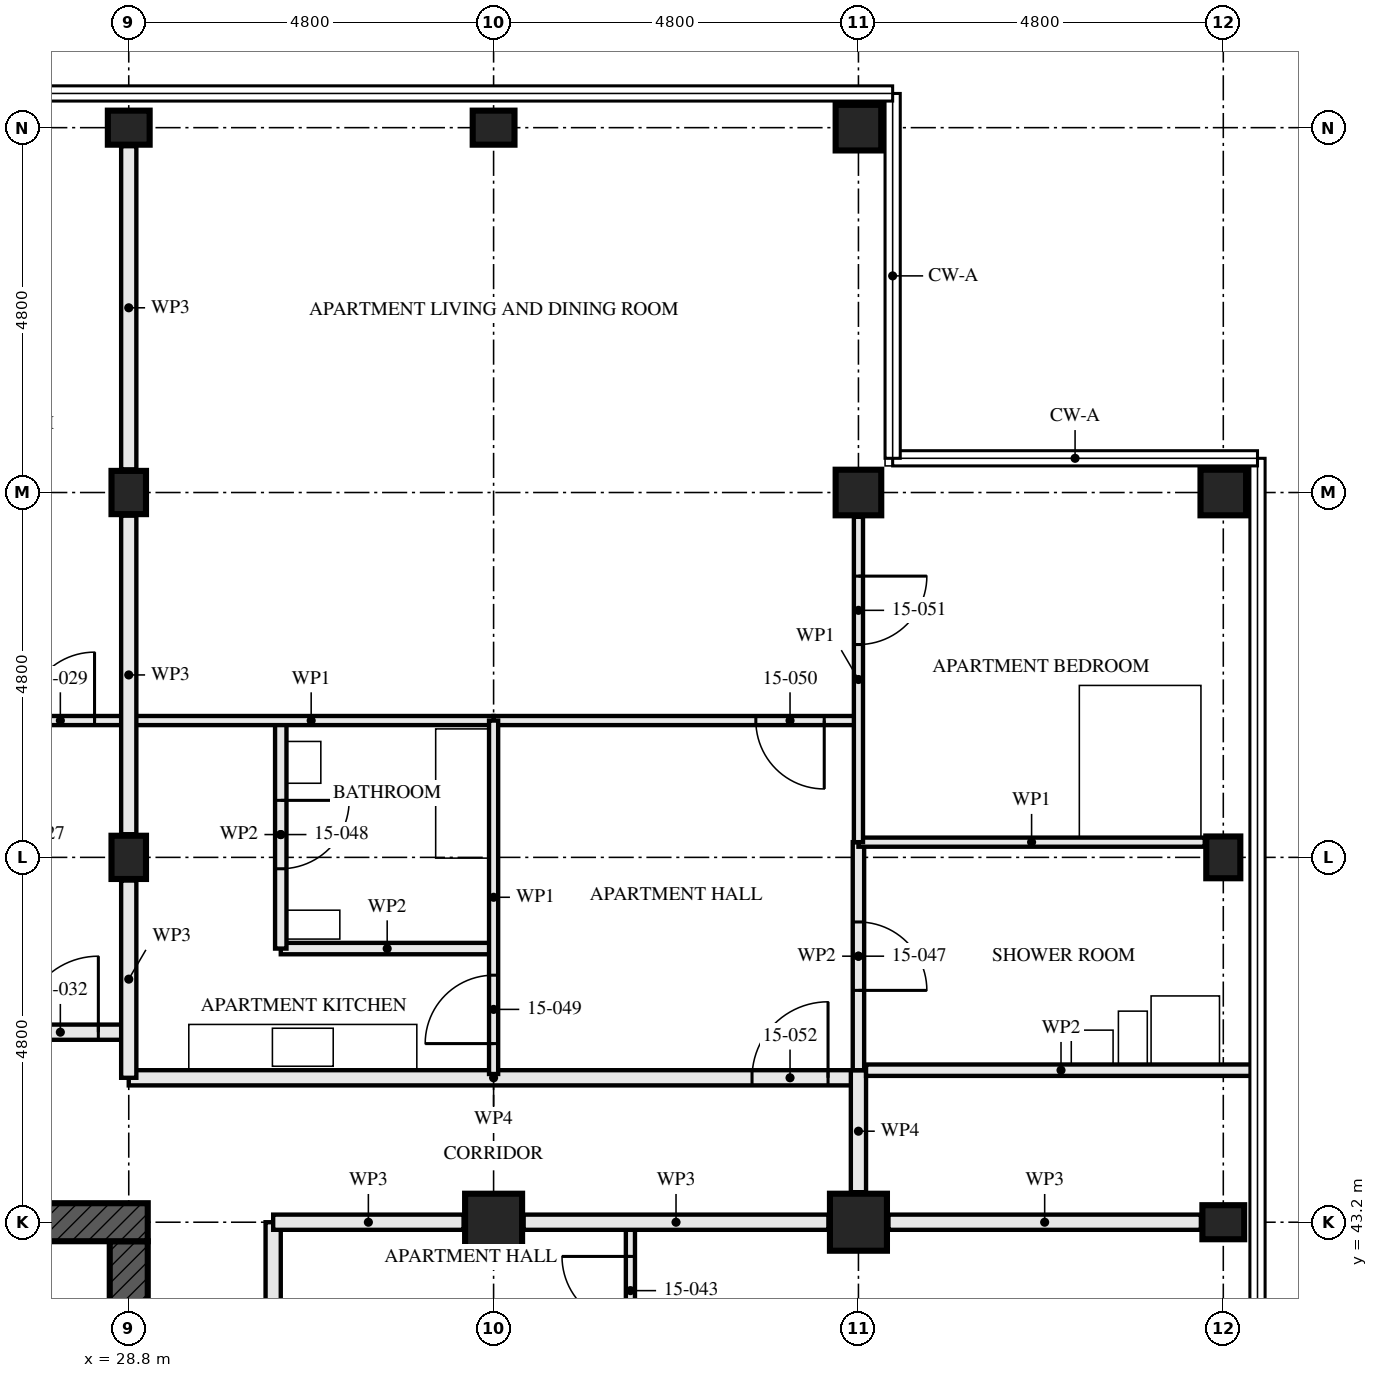
"""IFC4 building model, lengths in metres.
Left out: names, types, materials, properties, quantities, classifications, styles, units other than length and angle.
Written with IfcOpenShell. Run it as: python <this file> out.ifc"""

import sys

from ifc_helpers import new_model, si_unit, direction, frame, frame_2d, origin, origin_2d, place, context, subcontext, project, spatial, rectangle, hollow_rectangle, i_section, extrude, element, fill, save


model = new_model("IFC4")
c1 = context("Model", 3, precision=1e-05, world=origin(), true_north=direction((0.0, 1.0)))
c2 = subcontext(c1, "Body", "Model", "MODEL_VIEW")
j1 = project(units=[si_unit("LENGTHUNIT", "METRE"), si_unit("PLANEANGLEUNIT", "RADIAN")], contexts=[c1])
p1 = place(None, origin())
s1 = spatial("IfcSite", under=j1, at=p1, CompositionType="ELEMENT")
p2 = place(p1, origin())
s2 = spatial("IfcBuilding", under=s1, at=p2, CompositionType="ELEMENT")
p3 = place(p2, frame((0.0, 0.0, 58.5)))
s3 = spatial("IfcBuildingStorey", under=s2, at=p3, CompositionType="ELEMENT", Elevation=58.5)
for number, where, z_axis, x_axis in (
    (1, (28.8, 48.0, 0.0), (0.0, 0.0, 1.0), (1.0, 0.0, 0.0)),
    (2, (28.8, 52.8, 0.0), (0.0, 0.0, 1.0), (1.0, 0.0, 0.0)),
):
    element("IfcColumn", number, at=place(p3, frame(where, z_axis=z_axis, x_axis=x_axis)), inside=s3, PredefinedType="COLUMN", context=c2, shape_type="SweptSolid", body=[
        extrude(i_section(OverallWidth=0.454, OverallDepth=0.569, WebThickness=0.078, FlangeThickness=0.125, FilletRadius=0.015, at=origin_2d()), origin(), (0.0, 0.0, 1.0), 3.5),
    ])
p4 = place(p3, frame((28.8, 57.6, 0.0), z_axis=(0.0, 0.0, 1.0), x_axis=(0.0, 1.0, 0.0)))
e3 = element("IfcColumn", 3, at=p4, inside=s3, PredefinedType="COLUMN", context=c2, shape_type="SweptSolid", body=[
    extrude(i_section(OverallWidth=0.448, OverallDepth=0.55, WebThickness=0.072, FlangeThickness=0.115, FilletRadius=0.015, at=origin_2d()), origin(), (0.0, 0.0, 1.0), 3.5),
])
p5 = place(p3, frame((33.6, 43.2, 0.0), z_axis=(0.0, 0.0, 1.0), x_axis=(0.0, 1.0, 0.0)))
e4 = element("IfcColumn", 4, at=p5, inside=s3, PredefinedType="COLUMN", context=c2, shape_type="SweptSolid", body=[
    extrude(hollow_rectangle(XDim=0.75, YDim=0.75, WallThickness=0.08, at=origin_2d()), origin(), (0.0, 0.0, 1.0), 3.5),
])
p6 = place(p3, frame((33.6, 57.6, 0.0), z_axis=(0.0, 0.0, 1.0), x_axis=(0.0, 1.0, 0.0)))
e5 = element("IfcColumn", 5, at=p6, inside=s3, PredefinedType="COLUMN", context=c2, shape_type="SweptSolid", body=[
    extrude(i_section(OverallWidth=0.448, OverallDepth=0.55, WebThickness=0.072, FlangeThickness=0.115, FilletRadius=0.015, at=origin_2d()), origin(), (0.0, 0.0, 1.0), 3.5),
])
p7 = place(p3, frame((38.4, 43.2, 0.0), z_axis=(0.0, 0.0, 1.0), x_axis=(0.0, 1.0, 0.0)))
e6 = element("IfcColumn", 6, at=p7, inside=s3, PredefinedType="COLUMN", context=c2, shape_type="SweptSolid", body=[
    extrude(hollow_rectangle(XDim=0.75, YDim=0.75, WallThickness=0.08, at=origin_2d()), origin(), (0.0, 0.0, 1.0), 3.5),
])
for number, where, z_axis, x_axis in (
    (7, (38.4, 52.8, 0.0), (0.0, 0.0, 1.0), (0.0, 1.0, 0.0)),
    (8, (38.4, 57.6, 0.0), (0.0, 0.0, 1.0), (0.0, 1.0, 0.0)),
):
    element("IfcColumn", number, at=place(p3, frame(where, z_axis=z_axis, x_axis=x_axis)), inside=s3, PredefinedType="COLUMN", context=c2, shape_type="SweptSolid", body=[
        extrude(hollow_rectangle(XDim=0.6, YDim=0.6, WallThickness=0.05, at=origin_2d()), origin(), (0.0, 0.0, 1.0), 3.5),
    ])
for number, where, z_axis, x_axis in (
    (9, (43.2, 43.2, 0.0), (0.0, 0.0, 1.0), (0.0, 1.0, 0.0)),
    (10, (43.2, 48.0, 0.0), (0.0, 0.0, 1.0), (1.0, 0.0, 0.0)),
):
    element("IfcColumn", number, at=place(p3, frame(where, z_axis=z_axis, x_axis=x_axis)), inside=s3, PredefinedType="COLUMN", context=c2, shape_type="SweptSolid", body=[
        extrude(i_section(OverallWidth=0.448, OverallDepth=0.55, WebThickness=0.072, FlangeThickness=0.115, FilletRadius=0.015, at=origin_2d()), origin(), (0.0, 0.0, 1.0), 3.5),
    ])
p8 = place(p3, frame((43.2, 52.8, 0.0), z_axis=(0.0, 0.0, 1.0), x_axis=(0.0, 1.0, 0.0)))
e11 = element("IfcColumn", 11, at=p8, inside=s3, PredefinedType="COLUMN", context=c2, shape_type="SweptSolid", body=[
    extrude(hollow_rectangle(XDim=0.6, YDim=0.6, WallThickness=0.05, at=origin_2d()), origin(), (0.0, 0.0, 1.0), 3.5),
])
p9 = place(p3, frame((29.05, 43.2, -0.17), z_axis=(0.0, 0.0, 1.0), x_axis=(-1.0, 0.0, 0.0)))
e12 = element("IfcWall", 12, at=p9, inside=s3, PredefinedType="SHEAR", context=c2, shape_type="SweptSolid", body=[
    extrude(rectangle(XDim=14.9, YDim=0.5, at=frame_2d((7.45, 0.0))), origin(), (0.0, 0.0, 1.0), 3.5),
])
p10 = place(p9, frame((6.85, 0.0, 0.17)))
e13 = element("IfcOpeningElement", 13, at=p10, cuts=e12, PredefinedType="OPENING", context=c2, shape_type="SweptSolid", body=[
    extrude(rectangle(XDim=1.2, YDim=2.1, at=frame_2d((0.6, 1.05))), frame((0.0, 0.26, 0.0), z_axis=(0.0, -1.0, 0.0), x_axis=(1.0, 0.0, 0.0)), (0.0, 0.0, 1.0), 0.521),
])
p11 = place(p3, frame((28.8, 29.05, -0.17), z_axis=(0.0, 0.0, 1.0), x_axis=(0.0, 1.0, 0.0)))
e14 = element("IfcWall", 14, at=p11, inside=s3, PredefinedType="SHEAR", context=c2, shape_type="SweptSolid", body=[
    extrude(rectangle(XDim=13.9, YDim=0.5, at=frame_2d((6.95, 0.0))), origin(), (0.0, 0.0, 1.0), 3.5),
])
p12 = place(p11, frame((6.35, 0.0, 0.17)))
e15 = element("IfcOpeningElement", 15, at=p12, cuts=e14, PredefinedType="OPENING", context=c2, shape_type="SweptSolid", body=[
    extrude(rectangle(XDim=1.2, YDim=2.1, at=frame_2d((0.6, 1.05))), frame((0.0, 0.26, 0.0), z_axis=(0.0, -1.0, 0.0), x_axis=(1.0, 0.0, 0.0)), (0.0, 0.0, 1.0), 0.521),
])
p13 = place(p3, frame((28.8, 49.8, 0.0), z_axis=(0.0, 0.0, 1.0), x_axis=(-1.0, 0.0, 0.0)))
e16 = element("IfcWall", 16, at=p13, inside=s3, PredefinedType="PARTITIONING", context=c2, shape_type="SweptSolid", body=[
    extrude(rectangle(XDim=4.8, YDim=0.12, at=frame_2d((2.4, 0.0))), origin(), (0.0, 0.0, 1.0), 3.33),
])
p14 = place(p13, frame((0.45, 0.0, 0.0)))
e17 = element("IfcOpeningElement", 17, at=p14, cuts=e16, PredefinedType="OPENING", context=c2, shape_type="SweptSolid", body=[
    extrude(rectangle(XDim=0.9, YDim=2.1, at=frame_2d((0.45, 1.05))), frame((0.0, 0.071, 0.0), z_axis=(0.0, -1.0, 0.0), x_axis=(1.0, 0.0, 0.0)), (0.0, 0.0, 1.0), 0.141),
])
p15 = place(p3, frame((28.8, 45.7, 0.0), z_axis=(0.0, 0.0, 1.0), x_axis=(-1.0, 0.0, 0.0)))
e18 = element("IfcWall", 18, at=p15, inside=s3, PredefinedType="PARTITIONING", context=c2, shape_type="SweptSolid", body=[
    extrude(rectangle(XDim=14.4, YDim=0.2, at=frame_2d((7.2, 0.0))), origin(), (0.0, 0.0, 1.0), 3.33),
])
p16 = place(p15, frame((0.4, 0.0, 0.0)))
e19 = element("IfcOpeningElement", 19, at=p16, cuts=e18, PredefinedType="OPENING", context=c2, shape_type="SweptSolid", body=[
    extrude(rectangle(XDim=1.0, YDim=2.1, at=frame_2d((0.5, 1.05))), frame((0.0, 0.111, 0.0), z_axis=(0.0, -1.0, 0.0), x_axis=(1.0, 0.0, 0.0)), (0.0, 0.0, 1.0), 0.221),
])
p17 = place(p3, frame((35.4, 38.4, 0.0), z_axis=(0.0, 0.0, 1.0), x_axis=(0.0, 1.0, 0.0)))
e20 = element("IfcWall", 20, at=p17, inside=s3, PredefinedType="PARTITIONING", context=c2, shape_type="SweptSolid", body=[
    extrude(rectangle(XDim=4.8, YDim=0.12, at=frame_2d((2.4, 0.0))), origin(), (0.0, 0.0, 1.0), 3.33),
])
p18 = place(p17, frame((3.45, 0.0, 0.0)))
e21 = element("IfcOpeningElement", 21, at=p18, cuts=e20, PredefinedType="OPENING", context=c2, shape_type="SweptSolid", body=[
    extrude(rectangle(XDim=0.9, YDim=2.1, at=frame_2d((0.45, 1.05))), frame((0.0, 0.071, 0.0), z_axis=(0.0, -1.0, 0.0), x_axis=(1.0, 0.0, 0.0)), (0.0, 0.0, 1.0), 0.141),
])
p19 = place(p3, frame((30.7, 28.8, 0.0), z_axis=(0.0, 0.0, 1.0), x_axis=(0.0, 1.0, 0.0)))
e22 = element("IfcWall", 22, at=p19, inside=s3, PredefinedType="PARTITIONING", context=c2, shape_type="SweptSolid", body=[
    extrude(rectangle(XDim=14.4, YDim=0.2, at=frame_2d((7.2, 0.0))), origin(), (0.0, 0.0, 1.0), 2.55),
])
p20 = place(p19, frame((1.4, 0.0, 0.0)))
e23 = element("IfcOpeningElement", 23, at=p20, cuts=e22, PredefinedType="OPENING", context=c2, shape_type="SweptSolid", body=[
    extrude(rectangle(XDim=1.0, YDim=2.1, at=frame_2d((0.5, 1.05))), frame((0.0, 0.111, 0.0), z_axis=(0.0, -1.0, 0.0), x_axis=(1.0, 0.0, 0.0)), (0.0, 0.0, 1.0), 0.221),
])
p21 = place(p19, frame((4.1, 0.0, 0.0)))
e24 = element("IfcOpeningElement", 24, at=p21, cuts=e22, PredefinedType="OPENING", context=c2, shape_type="SweptSolid", body=[
    extrude(rectangle(XDim=1.0, YDim=2.1, at=frame_2d((0.5, 1.05))), frame((0.0, 0.111, 0.0), z_axis=(0.0, -1.0, 0.0), x_axis=(1.0, 0.0, 0.0)), (0.0, 0.0, 1.0), 0.221),
])
p22 = place(p19, frame((10.0, 0.0, 0.0)))
e25 = element("IfcOpeningElement", 25, at=p22, cuts=e22, PredefinedType="OPENING", context=c2, shape_type="SweptSolid", body=[
    extrude(rectangle(XDim=1.0, YDim=2.1, at=frame_2d((0.5, 1.05))), frame((0.0, 0.111, 0.0), z_axis=(0.0, -1.0, 0.0), x_axis=(1.0, 0.0, 0.0)), (0.0, 0.0, 1.0), 0.221),
])
p23 = place(p3, frame((38.4, 48.2, 0.0), z_axis=(0.0, 0.0, 1.0), x_axis=(0.0, -1.0, 0.0)))
e26 = element("IfcWall", 26, at=p23, inside=s3, PredefinedType="PARTITIONING", context=c2, shape_type="SweptSolid", body=[
    extrude(rectangle(XDim=3.0, YDim=0.15, at=frame_2d((1.5, 0.0))), origin(), (0.0, 0.0, 1.0), 2.55),
])
p24 = place(p23, frame((1.05, 0.0, 0.0)))
e27 = element("IfcOpeningElement", 27, at=p24, cuts=e26, PredefinedType="OPENING", context=c2, shape_type="SweptSolid", body=[
    extrude(rectangle(XDim=0.9, YDim=2.1, at=frame_2d((0.45, 1.05))), frame((0.0, 0.085, 0.0), z_axis=(0.0, -1.0, 0.0), x_axis=(1.0, 0.0, 0.0)), (0.0, 0.0, 1.0), 0.171),
])
p25 = place(p3, frame((30.8, 49.8, 0.0), z_axis=(0.0, 0.0, 1.0), x_axis=(0.0, -1.0, 0.0)))
e28 = element("IfcWall", 28, at=p25, inside=s3, PredefinedType="PARTITIONING", context=c2, shape_type="SweptSolid", body=[
    extrude(rectangle(XDim=3.0, YDim=0.15, at=frame_2d((1.5, 0.0))), origin(), (0.0, 0.0, 1.0), 2.55),
])
p26 = place(p25, frame((1.05, 0.0, 0.0)))
e29 = element("IfcOpeningElement", 29, at=p26, cuts=e28, PredefinedType="OPENING", context=c2, shape_type="SweptSolid", body=[
    extrude(rectangle(XDim=0.9, YDim=2.1, at=frame_2d((0.45, 1.05))), frame((0.0, 0.085, 0.0), z_axis=(0.0, -1.0, 0.0), x_axis=(1.0, 0.0, 0.0)), (0.0, 0.0, 1.0), 0.171),
])
p27 = place(p3, frame((33.6, 46.8, 0.0), z_axis=(0.0, 0.0, 1.0), x_axis=(-1.0, 0.0, 0.0)))
e30 = element("IfcWall", 30, at=p27, inside=s3, PredefinedType="PARTITIONING", context=c2, shape_type="SweptSolid", body=[
    extrude(rectangle(XDim=2.8, YDim=0.15, at=frame_2d((1.4, 0.0))), origin(), (0.0, 0.0, 1.0), 3.33),
])
p28 = place(p3, frame((33.6, 49.8, 0.0), z_axis=(0.0, 0.0, 1.0), x_axis=(0.0, -1.0, 0.0)))
e31 = element("IfcWall", 31, at=p28, inside=s3, PredefinedType="PARTITIONING", context=c2, shape_type="SweptSolid", body=[
    extrude(rectangle(XDim=4.65, YDim=0.12, at=frame_2d((2.325, 0.0))), origin(), (0.0, 0.0, 1.0), 2.55),
])
p29 = place(p28, frame((3.35, 0.0, 0.0)))
e32 = element("IfcOpeningElement", 32, at=p29, cuts=e31, PredefinedType="OPENING", context=c2, shape_type="SweptSolid", body=[
    extrude(rectangle(XDim=0.9, YDim=2.1, at=frame_2d((0.45, 1.05))), frame((0.0, 0.071, 0.0), z_axis=(0.0, -1.0, 0.0), x_axis=(1.0, 0.0, 0.0)), (0.0, 0.0, 1.0), 0.141),
])
p30 = place(p3, frame((42.956, 48.2, 0.0), z_axis=(0.0, 0.0, 1.0), x_axis=(-1.0, 0.0, 0.0)))
e33 = element("IfcWall", 33, at=p30, inside=s3, PredefinedType="PARTITIONING", context=c2, shape_type="SweptSolid", body=[
    extrude(rectangle(XDim=4.556, YDim=0.12, at=frame_2d((2.278, 0.0))), origin(), (0.0, 0.0, 1.0), 3.33),
])
p31 = place(p3, frame((38.4, 49.8, 0.0), z_axis=(0.0, 0.0, 1.0), x_axis=(-1.0, 0.0, 0.0)))
e34 = element("IfcWall", 34, at=p31, inside=s3, PredefinedType="PARTITIONING", context=c2, shape_type="SweptSolid", body=[
    extrude(rectangle(XDim=4.8, YDim=0.12, at=frame_2d((2.4, 0.0))), origin(), (0.0, 0.0, 1.0), 3.33),
])
p32 = place(p31, frame((0.45, 0.0, 0.0)))
e35 = element("IfcOpeningElement", 35, at=p32, cuts=e34, PredefinedType="OPENING", context=c2, shape_type="SweptSolid", body=[
    extrude(rectangle(XDim=0.9, YDim=2.1, at=frame_2d((0.45, 1.05))), frame((0.0, 0.071, 0.0), z_axis=(0.0, -1.0, 0.0), x_axis=(1.0, 0.0, 0.0)), (0.0, 0.0, 1.0), 0.141),
])
p33 = place(p3, frame((33.6, 49.8, 0.0), z_axis=(0.0, 0.0, 1.0), x_axis=(-1.0, 0.0, 0.0)))
e36 = element("IfcWall", 36, at=p33, inside=s3, PredefinedType="PARTITIONING", context=c2, shape_type="SweptSolid", body=[
    extrude(rectangle(XDim=4.8, YDim=0.12, at=frame_2d((2.4, 0.0))), origin(), (0.0, 0.0, 1.0), 3.33),
])
p34 = place(p3, frame((38.4, 52.48, 0.0), z_axis=(0.0, 0.0, 1.0), x_axis=(0.0, -1.0, 0.0)))
e37 = element("IfcWall", 37, at=p34, inside=s3, PredefinedType="PARTITIONING", context=c2, shape_type="SweptSolid", body=[
    extrude(rectangle(XDim=4.28, YDim=0.12, at=frame_2d((2.14, 0.0))), origin(), (0.0, 0.0, 1.0), 3.33),
])
p35 = place(p34, frame((0.78, 0.0, 0.0)))
e38 = element("IfcOpeningElement", 38, at=p35, cuts=e37, PredefinedType="OPENING", context=c2, shape_type="SweptSolid", body=[
    extrude(rectangle(XDim=0.9, YDim=2.1, at=frame_2d((0.45, 1.05))), frame((0.0, 0.071, 0.0), z_axis=(0.0, -1.0, 0.0), x_axis=(1.0, 0.0, 0.0)), (0.0, 0.0, 1.0), 0.141),
])
p36 = place(p3, frame((38.4, 45.1, 0.0), z_axis=(0.0, 0.0, 1.0), x_axis=(-1.0, 0.0, 0.0)))
e39 = element("IfcWall", 39, at=p36, inside=s3, PredefinedType="PARTITIONING", context=c2, shape_type="SweptSolid", body=[
    extrude(rectangle(XDim=9.6, YDim=0.2, at=frame_2d((4.8, 0.0))), origin(), (0.0, 0.0, 1.0), 3.33),
])
p37 = place(p36, frame((0.4, 0.0, 0.0)))
e40 = element("IfcOpeningElement", 40, at=p37, cuts=e39, PredefinedType="OPENING", context=c2, shape_type="SweptSolid", body=[
    extrude(rectangle(XDim=1.0, YDim=2.1, at=frame_2d((0.5, 1.05))), frame((0.0, 0.111, 0.0), z_axis=(0.0, -1.0, 0.0), x_axis=(1.0, 0.0, 0.0)), (0.0, 0.0, 1.0), 0.221),
])
p38 = place(p3, frame((38.4, 45.2, 0.0), z_axis=(0.0, 0.0, 1.0), x_axis=(0.0, -1.0, 0.0)))
e41 = element("IfcWall", 41, at=p38, inside=s3, PredefinedType="PARTITIONING", context=c2, shape_type="SweptSolid", body=[
    extrude(rectangle(XDim=1.605, YDim=0.2, at=frame_2d((0.802, 0.0))), origin(), (0.0, 0.0, 1.0), 3.33),
])
p39 = place(p3, frame((28.8, 45.1, 0.0), z_axis=(0.0, 0.0, 1.0), x_axis=(0.0, 1.0, 0.0)))
e42 = element("IfcWall", 42, at=p39, inside=s3, PredefinedType="PARTITIONING", context=c2, shape_type="SweptSolid", body=[
    extrude(rectangle(XDim=2.595, YDim=0.2, at=frame_2d((1.298, 0.0))), origin(), (0.0, 0.0, 1.0), 2.32),
])
p40 = place(p3, frame((28.8, 48.304, 0.0), z_axis=(0.0, 0.0, 1.0), x_axis=(0.0, 1.0, 0.0)))
e43 = element("IfcWall", 43, at=p40, inside=s3, PredefinedType="PARTITIONING", context=c2, shape_type="SweptSolid", body=[
    extrude(rectangle(XDim=4.191, YDim=0.2, at=frame_2d((2.096, 0.0))), origin(), (0.0, 0.0, 1.0), 2.32),
])
p41 = place(p3, frame((28.8, 53.104, 0.0), z_axis=(0.0, 0.0, 1.0), x_axis=(0.0, 1.0, 0.0)))
e44 = element("IfcWall", 44, at=p41, inside=s3, PredefinedType="PARTITIONING", context=c2, shape_type="SweptSolid", body=[
    extrude(rectangle(XDim=4.251, YDim=0.2, at=frame_2d((2.126, 0.0))), origin(), (0.0, 0.0, 1.0), 2.32),
])
p42 = place(p3, frame((42.905, 43.2, 0.0), z_axis=(0.0, 0.0, 1.0), x_axis=(-1.0, 0.0, 0.0)))
e45 = element("IfcWall", 45, at=p42, inside=s3, PredefinedType="PARTITIONING", context=c2, shape_type="SweptSolid", body=[
    extrude(rectangle(XDim=4.11, YDim=0.2, at=frame_2d((2.055, 0.0))), origin(), (0.0, 0.0, 1.0), 2.32),
])
p43 = place(p3, frame((38.005, 43.2, 0.0), z_axis=(0.0, 0.0, 1.0), x_axis=(-1.0, 0.0, 0.0)))
e46 = element("IfcWall", 46, at=p43, inside=s3, PredefinedType="PARTITIONING", context=c2, shape_type="SweptSolid", body=[
    extrude(rectangle(XDim=4.01, YDim=0.2, at=frame_2d((2.005, 0.0))), origin(), (0.0, 0.0, 1.0), 2.32),
])
p44 = place(p3, frame((33.205, 43.2, 0.0), z_axis=(0.0, 0.0, 1.0), x_axis=(-1.0, 0.0, 0.0)))
e47 = element("IfcWall", 47, at=p44, inside=s3, PredefinedType="PARTITIONING", context=c2, shape_type="SweptSolid", body=[
    extrude(rectangle(XDim=2.505, YDim=0.2, at=frame_2d((1.252, 0.0))), origin(), (0.0, 0.0, 1.0), 2.32),
])
p45 = place(p3, frame((43.63, 45.2, 0.0), z_axis=(0.0, 0.0, 1.0), x_axis=(-1.0, 0.0, 0.0)))
e48 = element("IfcWall", 48, at=p45, inside=s3, PredefinedType="PARTITIONING", context=c2, shape_type="SweptSolid", body=[
    extrude(rectangle(XDim=5.13, YDim=0.15, at=frame_2d((2.565, 0.0))), origin(), (0.0, 0.0, 1.0), 2.32),
])
p46 = place(p14, frame((0.9, 0.0, 0.0), z_axis=(0.0, 0.0, 1.0), x_axis=(-1.0, 0.0, 0.0)))
e49 = element("IfcDoor", 49, at=p46, inside=s3, OperationType="SINGLE_SWING_LEFT", PredefinedType="DOOR", context=c2, shape_type="SweptSolid", body=[
    extrude(rectangle(XDim=0.9, YDim=2.1, at=frame_2d((0.45, 1.05))), frame((0.0, 0.022, 0.0), z_axis=(0.0, -1.0, 0.0), x_axis=(1.0, 0.0, 0.0)), (0.0, 0.0, 1.0), 0.044),
])
fill(e17, e49)
p47 = place(p16, frame((1.0, 0.0, 0.0), z_axis=(0.0, 0.0, 1.0), x_axis=(-1.0, 0.0, 0.0)))
e50 = element("IfcDoor", 50, at=p47, inside=s3, OperationType="SINGLE_SWING_LEFT", PredefinedType="DOOR", context=c2, shape_type="SweptSolid", body=[
    extrude(rectangle(XDim=1.0, YDim=2.1, at=frame_2d((0.5, 1.05))), frame((0.0, 0.027, 0.0), z_axis=(0.0, -1.0, 0.0), x_axis=(1.0, 0.0, 0.0)), (0.0, 0.0, 1.0), 0.054),
])
fill(e19, e50)
p48 = place(p18, origin())
e51 = element("IfcDoor", 51, at=p48, inside=s3, OperationType="SINGLE_SWING_LEFT", PredefinedType="DOOR", context=c2, shape_type="SweptSolid", body=[
    extrude(rectangle(XDim=0.9, YDim=2.1, at=frame_2d((0.45, 1.05))), frame((0.0, 0.022, 0.0), z_axis=(0.0, -1.0, 0.0), x_axis=(1.0, 0.0, 0.0)), (0.0, 0.0, 1.0), 0.044),
])
fill(e21, e51)
p49 = place(p24, origin())
e52 = element("IfcDoor", 52, at=p49, inside=s3, OperationType="SINGLE_SWING_LEFT", PredefinedType="DOOR", context=c2, shape_type="SweptSolid", body=[
    extrude(rectangle(XDim=0.9, YDim=2.1, at=frame_2d((0.45, 1.05))), frame((0.0, 0.022, 0.0), z_axis=(0.0, -1.0, 0.0), x_axis=(1.0, 0.0, 0.0)), (0.0, 0.0, 1.0), 0.044),
])
fill(e27, e52)
p50 = place(p26, origin())
e53 = element("IfcDoor", 53, at=p50, inside=s3, OperationType="SINGLE_SWING_RIGHT", PredefinedType="DOOR", context=c2, shape_type="SweptSolid", body=[
    extrude(rectangle(XDim=0.9, YDim=2.1, at=frame_2d((0.45, 1.05))), frame((0.0, 0.022, 0.0), z_axis=(0.0, -1.0, 0.0), x_axis=(1.0, 0.0, 0.0)), (0.0, 0.0, 1.0), 0.044),
])
fill(e29, e53)
p51 = place(p29, frame((0.9, 0.0, 0.0), z_axis=(0.0, 0.0, 1.0), x_axis=(-1.0, 0.0, 0.0)))
e54 = element("IfcDoor", 54, at=p51, inside=s3, OperationType="SINGLE_SWING_RIGHT", PredefinedType="DOOR", context=c2, shape_type="SweptSolid", body=[
    extrude(rectangle(XDim=0.9, YDim=2.1, at=frame_2d((0.45, 1.05))), frame((0.0, 0.022, 0.0), z_axis=(0.0, -1.0, 0.0), x_axis=(1.0, 0.0, 0.0)), (0.0, 0.0, 1.0), 0.044),
])
fill(e32, e54)
p52 = place(p32, origin())
e55 = element("IfcDoor", 55, at=p52, inside=s3, OperationType="SINGLE_SWING_RIGHT", PredefinedType="DOOR", context=c2, shape_type="SweptSolid", body=[
    extrude(rectangle(XDim=0.9, YDim=2.1, at=frame_2d((0.45, 1.05))), frame((0.0, 0.022, 0.0), z_axis=(0.0, -1.0, 0.0), x_axis=(1.0, 0.0, 0.0)), (0.0, 0.0, 1.0), 0.044),
])
fill(e35, e55)
p53 = place(p35, origin())
e56 = element("IfcDoor", 56, at=p53, inside=s3, OperationType="SINGLE_SWING_RIGHT", PredefinedType="DOOR", context=c2, shape_type="SweptSolid", body=[
    extrude(rectangle(XDim=0.9, YDim=2.1, at=frame_2d((0.45, 1.05))), frame((0.0, 0.022, 0.0), z_axis=(0.0, -1.0, 0.0), x_axis=(1.0, 0.0, 0.0)), (0.0, 0.0, 1.0), 0.044),
])
fill(e38, e56)
p54 = place(p37, frame((1.0, 0.0, 0.0), z_axis=(0.0, 0.0, 1.0), x_axis=(-1.0, 0.0, 0.0)))
e57 = element("IfcDoor", 57, at=p54, inside=s3, OperationType="SINGLE_SWING_LEFT", PredefinedType="DOOR", context=c2, shape_type="SweptSolid", body=[
    extrude(rectangle(XDim=1.0, YDim=2.1, at=frame_2d((0.5, 1.05))), frame((0.0, 0.027, 0.0), z_axis=(0.0, -1.0, 0.0), x_axis=(1.0, 0.0, 0.0)), (0.0, 0.0, 1.0), 0.054),
])
fill(e40, e57)
save(model, sys.argv[1])
